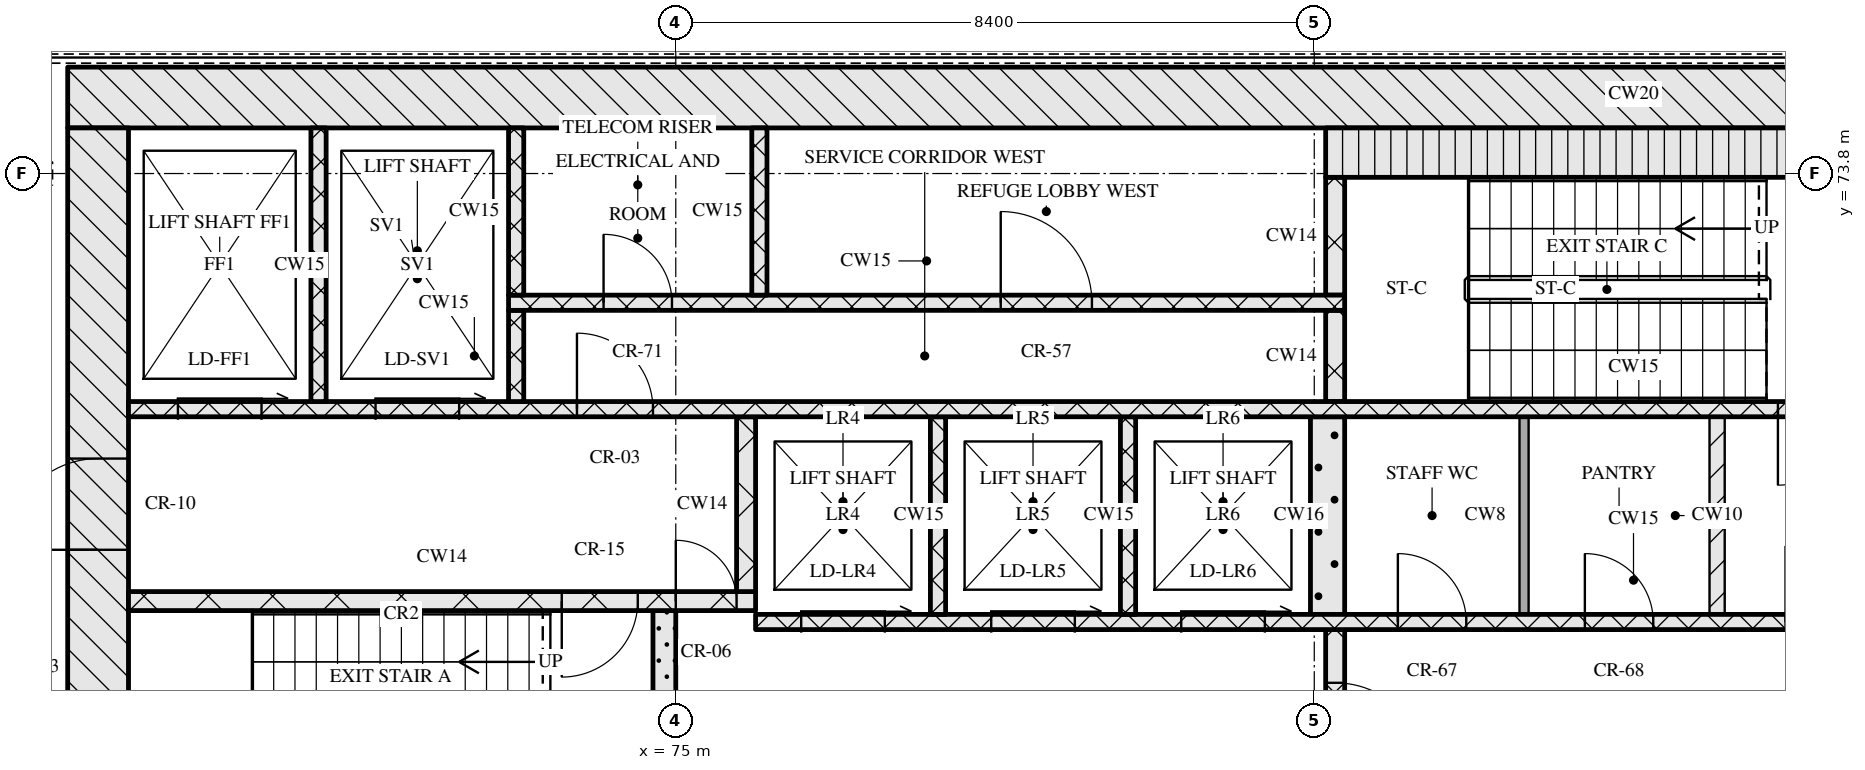
"""IFC4 building model, lengths in metres.
Left out: names, types, materials, properties, quantities, classifications, styles, units other than length and angle.
Written with IfcOpenShell. Run it as: python <this file> out.ifc"""

import sys

from ifc_helpers import new_model, si_unit, direction, frame, frame_2d, origin, place, context, subcontext, project, spatial, rectangle, extrude, element, fill, save


model = new_model("IFC4")
c1 = context("Model", 3, precision=1e-05, world=origin(), true_north=direction((0.0, 1.0)))
c2 = subcontext(c1, "Body", "Model", "MODEL_VIEW")
j1 = project(units=[si_unit("LENGTHUNIT", "METRE"), si_unit("PLANEANGLEUNIT", "RADIAN")], contexts=[c1])
p1 = place(None, origin())
s1 = spatial("IfcSite", under=j1, at=p1, CompositionType="ELEMENT")
p2 = place(p1, origin())
s2 = spatial("IfcBuilding", under=s1, at=p2, CompositionType="ELEMENT")
p3 = place(p2, frame((0.0, 0.0, 142.05)))
s3 = spatial("IfcBuildingStorey", under=s2, at=p3, CompositionType="ELEMENT", Elevation=142.05)
p4 = place(p3, frame((67.0, 74.8, 0.0), z_axis=(0.0, 0.0, 1.0), x_axis=(1.0, 0.0, 0.0)))
e1 = element("IfcWall", 1, at=p4, inside=s3, PredefinedType="SOLIDWALL", context=c2, shape_type="SweptSolid", body=[
    extrude(rectangle(XDim=41.2, YDim=0.8, at=frame_2d((20.6, 0.0))), origin(), (0.0, 0.0, 1.0), 5.12),
])
p5 = place(p3, frame((67.4, 62.4, 0.0), z_axis=(0.0, 0.0, 1.0), x_axis=(0.0, 1.0, 0.0)))
e2 = element("IfcWall", 2, at=p5, inside=s3, PredefinedType="SOLIDWALL", context=c2, shape_type="SweptSolid", body=[
    extrude(rectangle(XDim=12.0, YDim=0.8, at=frame_2d((6.0, 0.0))), origin(), (0.0, 0.0, 1.0), 5.12),
])
p6 = place(p5, frame((6.45, 0.0, 0.0)))
e3 = element("IfcOpeningElement", 3, at=p6, cuts=e2, PredefinedType="OPENING", context=c2, shape_type="SweptSolid", body=[
    extrude(rectangle(XDim=1.2, YDim=2.1, at=frame_2d((0.6, 1.05))), frame((0.0, 0.41, 0.0), z_axis=(0.0, -1.0, 0.0), x_axis=(1.0, 0.0, 0.0)), (0.0, 0.0, 1.0), 0.82),
])
p7 = place(p3, frame((74.85, 65.2, 0.0), z_axis=(0.0, 0.0, 1.0), x_axis=(0.0, 1.0, 0.0)))
e4 = element("IfcWall", 4, at=p7, inside=s3, PredefinedType="SOLIDWALL", context=c2, shape_type="SweptSolid", body=[
    extrude(rectangle(XDim=2.85, YDim=0.3, at=frame_2d((1.425, 0.0))), origin(), (0.0, 0.0, 1.0), 5.12),
])
p8 = place(p3, frame((83.675, 65.2, 0.0), z_axis=(0.0, 0.0, 1.0), x_axis=(0.0, 1.0, 0.0)))
e5 = element("IfcWall", 5, at=p8, inside=s3, PredefinedType="SOLIDWALL", context=c2, shape_type="SweptSolid", body=[
    extrude(rectangle(XDim=2.6, YDim=0.25, at=frame_2d((1.3, 0.0))), origin(), (0.0, 0.0, 1.0), 5.12),
])
p9 = place(p8, frame((0.7, 0.0, 0.0)))
e6 = element("IfcOpeningElement", 6, at=p9, cuts=e5, PredefinedType="OPENING", context=c2, shape_type="SweptSolid", body=[
    extrude(rectangle(XDim=1.2, YDim=2.1, at=frame_2d((0.6, 1.05))), frame((0.0, 0.135, 0.0), z_axis=(0.0, -1.0, 0.0), x_axis=(1.0, 0.0, 0.0)), (0.0, 0.0, 1.0), 0.27),
])
p10 = place(p3, frame((76.05, 67.9, 0.0), z_axis=(0.0, 0.0, 1.0), x_axis=(1.0, 0.0, 0.0)))
e7 = element("IfcWall", 7, at=p10, inside=s3, PredefinedType="SOLIDWALL", context=c2, shape_type="SweptSolid", body=[
    extrude(rectangle(XDim=23.1, YDim=0.2, at=frame_2d((11.55, 0.0))), origin(), (0.0, 0.0, 1.0), 5.12),
])
p11 = place(p10, frame((0.6, 0.0, 0.0)))
e8 = element("IfcOpeningElement", 8, at=p11, cuts=e7, PredefinedType="OPENING", context=c2, shape_type="SweptSolid", body=[
    extrude(rectangle(XDim=1.1, YDim=2.1, at=frame_2d((0.55, 1.05))), frame((0.0, 0.11, 0.0), z_axis=(0.0, -1.0, 0.0), x_axis=(1.0, 0.0, 0.0)), (0.0, 0.0, 1.0), 0.22),
])
p12 = place(p10, frame((3.1, 0.0, 0.0)))
e9 = element("IfcOpeningElement", 9, at=p12, cuts=e7, PredefinedType="OPENING", context=c2, shape_type="SweptSolid", body=[
    extrude(rectangle(XDim=1.1, YDim=2.1, at=frame_2d((0.55, 1.05))), frame((0.0, 0.11, 0.0), z_axis=(0.0, -1.0, 0.0), x_axis=(1.0, 0.0, 0.0)), (0.0, 0.0, 1.0), 0.22),
])
p13 = place(p10, frame((5.6, 0.0, 0.0)))
e10 = element("IfcOpeningElement", 10, at=p13, cuts=e7, PredefinedType="OPENING", context=c2, shape_type="SweptSolid", body=[
    extrude(rectangle(XDim=1.1, YDim=2.1, at=frame_2d((0.55, 1.05))), frame((0.0, 0.11, 0.0), z_axis=(0.0, -1.0, 0.0), x_axis=(1.0, 0.0, 0.0)), (0.0, 0.0, 1.0), 0.22),
])
p14 = place(p10, frame((8.45, 0.0, 0.0)))
e11 = element("IfcOpeningElement", 11, at=p14, cuts=e7, PredefinedType="OPENING", context=c2, shape_type="SweptSolid", body=[
    extrude(rectangle(XDim=0.9, YDim=2.1, at=frame_2d((0.45, 1.05))), frame((0.0, 0.11, 0.0), z_axis=(0.0, -1.0, 0.0), x_axis=(1.0, 0.0, 0.0)), (0.0, 0.0, 1.0), 0.22),
])
p15 = place(p10, frame((10.91, 0.0, 0.0)))
e12 = element("IfcOpeningElement", 12, at=p15, cuts=e7, PredefinedType="OPENING", context=c2, shape_type="SweptSolid", body=[
    extrude(rectangle(XDim=0.9, YDim=2.1, at=frame_2d((0.45, 1.05))), frame((0.0, 0.11, 0.0), z_axis=(0.0, -1.0, 0.0), x_axis=(1.0, 0.0, 0.0)), (0.0, 0.0, 1.0), 0.22),
])
p16 = place(p10, frame((13.55, 0.0, 0.0)))
e13 = element("IfcOpeningElement", 13, at=p16, cuts=e7, PredefinedType="OPENING", context=c2, shape_type="SweptSolid", body=[
    extrude(rectangle(XDim=1.0, YDim=2.1, at=frame_2d((0.5, 1.05))), frame((0.0, 0.11, 0.0), z_axis=(0.0, -1.0, 0.0), x_axis=(1.0, 0.0, 0.0)), (0.0, 0.0, 1.0), 0.22),
])
p17 = place(p10, frame((16.2, 0.0, 0.0)))
e14 = element("IfcOpeningElement", 14, at=p17, cuts=e7, PredefinedType="OPENING", context=c2, shape_type="SweptSolid", body=[
    extrude(rectangle(XDim=1.1, YDim=2.1, at=frame_2d((0.55, 1.05))), frame((0.0, 0.11, 0.0), z_axis=(0.0, -1.0, 0.0), x_axis=(1.0, 0.0, 0.0)), (0.0, 0.0, 1.0), 0.22),
])
p18 = place(p10, frame((18.7, 0.0, 0.0)))
e15 = element("IfcOpeningElement", 15, at=p18, cuts=e7, PredefinedType="OPENING", context=c2, shape_type="SweptSolid", body=[
    extrude(rectangle(XDim=1.1, YDim=2.1, at=frame_2d((0.55, 1.05))), frame((0.0, 0.11, 0.0), z_axis=(0.0, -1.0, 0.0), x_axis=(1.0, 0.0, 0.0)), (0.0, 0.0, 1.0), 0.22),
])
p19 = place(p10, frame((21.2, 0.0, 0.0)))
e16 = element("IfcOpeningElement", 16, at=p19, cuts=e7, PredefinedType="OPENING", context=c2, shape_type="SweptSolid", body=[
    extrude(rectangle(XDim=1.1, YDim=2.1, at=frame_2d((0.55, 1.05))), frame((0.0, 0.11, 0.0), z_axis=(0.0, -1.0, 0.0), x_axis=(1.0, 0.0, 0.0)), (0.0, 0.0, 1.0), 0.22),
])
for number, where, z_axis, x_axis in (
    (17, (78.45, 68.0, 0.0), (0.0, 0.0, 1.0), (0.0, 1.0, 0.0)),
    (18, (80.95, 68.0, 0.0), (0.0, 0.0, 1.0), (0.0, 1.0, 0.0)),
):
    element("IfcWall", number, at=place(p3, frame(where, z_axis=z_axis, x_axis=x_axis)), inside=s3, PredefinedType="SOLIDWALL", context=c2, shape_type="SweptSolid", body=[
        extrude(rectangle(XDim=2.6, YDim=0.2, at=frame_2d((1.3, 0.0))), origin(), (0.0, 0.0, 1.0), 5.12),
    ])
p20 = place(p3, frame((83.575, 68.0, 0.0), z_axis=(0.0, 0.0, 1.0), x_axis=(0.0, 1.0, 0.0)))
e19 = element("IfcWall", 19, at=p20, inside=s3, PredefinedType="SOLIDWALL", context=c2, shape_type="SweptSolid", body=[
    extrude(rectangle(XDim=2.6, YDim=0.45, at=frame_2d((1.3, 0.0))), origin(), (0.0, 0.0, 1.0), 5.12),
])
p21 = place(p3, frame((86.16, 68.0, 0.0), z_axis=(0.0, 0.0, 1.0), x_axis=(0.0, 1.0, 0.0)))
e20 = element("IfcWall", 20, at=p21, inside=s3, PredefinedType="PARTITIONING", context=c2, shape_type="SweptSolid", body=[
    extrude(rectangle(XDim=2.6, YDim=0.12, at=frame_2d((1.3, 0.0))), origin(), (0.0, 0.0, 1.0), 5.12),
])
p22 = place(p3, frame((88.7, 68.0, 0.0), z_axis=(0.0, 0.0, 1.0), x_axis=(0.0, 1.0, 0.0)))
e21 = element("IfcWall", 21, at=p22, inside=s3, PredefinedType="PARTITIONING", context=c2, shape_type="SweptSolid", body=[
    extrude(rectangle(XDim=2.6, YDim=0.2, at=frame_2d((1.3, 0.0))), origin(), (0.0, 0.0, 1.0), 5.12),
])
p23 = place(p3, frame((67.8, 68.175, 0.0), z_axis=(0.0, 0.0, 1.0), x_axis=(1.0, 0.0, 0.0)))
e22 = element("IfcWall", 22, at=p23, inside=s3, PredefinedType="SOLIDWALL", context=c2, shape_type="SweptSolid", body=[
    extrude(rectangle(XDim=8.25, YDim=0.25, at=frame_2d((4.125, 0.0))), origin(), (0.0, 0.0, 1.0), 5.12),
])
p24 = place(p23, frame((5.7, 0.0, 0.0)))
e23 = element("IfcOpeningElement", 23, at=p24, cuts=e22, PredefinedType="OPENING", context=c2, shape_type="SweptSolid", body=[
    extrude(rectangle(XDim=1.0, YDim=2.1, at=frame_2d((0.5, 1.05))), frame((0.0, 0.135, 0.0), z_axis=(0.0, -1.0, 0.0), x_axis=(1.0, 0.0, 0.0)), (0.0, 0.0, 1.0), 0.27),
])
p25 = place(p23, frame((7.2, 0.0, 0.0)))
e24 = element("IfcOpeningElement", 24, at=p25, cuts=e22, PredefinedType="OPENING", context=c2, shape_type="SweptSolid", body=[
    extrude(rectangle(XDim=0.8, YDim=2.1, at=frame_2d((0.4, 1.05))), frame((0.0, 0.135, 0.0), z_axis=(0.0, -1.0, 0.0), x_axis=(1.0, 0.0, 0.0)), (0.0, 0.0, 1.0), 0.27),
])
p26 = place(p3, frame((75.925, 68.3, 0.0), z_axis=(0.0, 0.0, 1.0), x_axis=(0.0, 1.0, 0.0)))
e25 = element("IfcWall", 25, at=p26, inside=s3, PredefinedType="SOLIDWALL", context=c2, shape_type="SweptSolid", body=[
    extrude(rectangle(XDim=2.3, YDim=0.25, at=frame_2d((1.15, 0.0))), origin(), (0.0, 0.0, 1.0), 5.12),
])
p27 = place(p3, frame((67.8, 70.7, 0.0), z_axis=(0.0, 0.0, 1.0), x_axis=(1.0, 0.0, 0.0)))
e26 = element("IfcWall", 26, at=p27, inside=s3, PredefinedType="SOLIDWALL", context=c2, shape_type="SweptSolid", body=[
    extrude(rectangle(XDim=39.6, YDim=0.2, at=frame_2d((19.8, 0.0))), origin(), (0.0, 0.0, 1.0), 5.12),
])
p28 = place(p27, frame((0.65, 0.0, 0.0)))
e27 = element("IfcOpeningElement", 27, at=p28, cuts=e26, PredefinedType="OPENING", context=c2, shape_type="SweptSolid", body=[
    extrude(rectangle(XDim=1.1, YDim=2.1, at=frame_2d((0.55, 1.05))), frame((0.0, 0.11, 0.0), z_axis=(0.0, -1.0, 0.0), x_axis=(1.0, 0.0, 0.0)), (0.0, 0.0, 1.0), 0.22),
])
p29 = place(p27, frame((3.25, 0.0, 0.0)))
e28 = element("IfcOpeningElement", 28, at=p29, cuts=e26, PredefinedType="OPENING", context=c2, shape_type="SweptSolid", body=[
    extrude(rectangle(XDim=1.1, YDim=2.1, at=frame_2d((0.55, 1.05))), frame((0.0, 0.11, 0.0), z_axis=(0.0, -1.0, 0.0), x_axis=(1.0, 0.0, 0.0)), (0.0, 0.0, 1.0), 0.22),
])
p30 = place(p27, frame((5.9, 0.0, 0.0)))
e29 = element("IfcOpeningElement", 29, at=p30, cuts=e26, PredefinedType="OPENING", context=c2, shape_type="SweptSolid", body=[
    extrude(rectangle(XDim=1.0, YDim=2.1, at=frame_2d((0.5, 1.05))), frame((0.0, 0.11, 0.0), z_axis=(0.0, -1.0, 0.0), x_axis=(1.0, 0.0, 0.0)), (0.0, 0.0, 1.0), 0.22),
])
p31 = place(p27, frame((21.7, 0.0, 0.0)))
e30 = element("IfcOpeningElement", 30, at=p31, cuts=e26, PredefinedType="OPENING", context=c2, shape_type="SweptSolid", body=[
    extrude(rectangle(XDim=1.0, YDim=2.1, at=frame_2d((0.5, 1.05))), frame((0.0, 0.11, 0.0), z_axis=(0.0, -1.0, 0.0), x_axis=(1.0, 0.0, 0.0)), (0.0, 0.0, 1.0), 0.22),
])
p32 = place(p27, frame((32.7, 0.0, 0.0)))
e31 = element("IfcOpeningElement", 31, at=p32, cuts=e26, PredefinedType="OPENING", context=c2, shape_type="SweptSolid", body=[
    extrude(rectangle(XDim=1.0, YDim=2.1, at=frame_2d((0.5, 1.05))), frame((0.0, 0.11, 0.0), z_axis=(0.0, -1.0, 0.0), x_axis=(1.0, 0.0, 0.0)), (0.0, 0.0, 1.0), 0.22),
])
p33 = place(p27, frame((35.25, 0.0, 0.0)))
e32 = element("IfcOpeningElement", 32, at=p33, cuts=e26, PredefinedType="OPENING", context=c2, shape_type="SweptSolid", body=[
    extrude(rectangle(XDim=1.1, YDim=2.1, at=frame_2d((0.55, 1.05))), frame((0.0, 0.11, 0.0), z_axis=(0.0, -1.0, 0.0), x_axis=(1.0, 0.0, 0.0)), (0.0, 0.0, 1.0), 0.22),
])
p34 = place(p27, frame((37.85, 0.0, 0.0)))
e33 = element("IfcOpeningElement", 33, at=p34, cuts=e26, PredefinedType="OPENING", context=c2, shape_type="SweptSolid", body=[
    extrude(rectangle(XDim=1.1, YDim=2.1, at=frame_2d((0.55, 1.05))), frame((0.0, 0.11, 0.0), z_axis=(0.0, -1.0, 0.0), x_axis=(1.0, 0.0, 0.0)), (0.0, 0.0, 1.0), 0.22),
])
p35 = place(p3, frame((70.3, 70.8, 0.0), z_axis=(0.0, 0.0, 1.0), x_axis=(0.0, 1.0, 0.0)))
e34 = element("IfcWall", 34, at=p35, inside=s3, PredefinedType="SOLIDWALL", context=c2, shape_type="SweptSolid", body=[
    extrude(rectangle(XDim=3.6, YDim=0.2, at=frame_2d((1.8, 0.0))), origin(), (0.0, 0.0, 1.0), 5.12),
])
p36 = place(p3, frame((72.9, 70.8, 0.0), z_axis=(0.0, 0.0, 1.0), x_axis=(0.0, 1.0, 0.0)))
e35 = element("IfcWall", 35, at=p36, inside=s3, PredefinedType="SOLIDWALL", context=c2, shape_type="SweptSolid", body=[
    extrude(rectangle(XDim=1.2, YDim=0.2, at=frame_2d((0.6, 0.0))), origin(), (0.0, 0.0, 1.0), 5.12),
])
p37 = place(p3, frame((83.675, 70.8, 0.0), z_axis=(0.0, 0.0, 1.0), x_axis=(0.0, 1.0, 0.0)))
e36 = element("IfcWall", 36, at=p37, inside=s3, PredefinedType="SOLIDWALL", context=c2, shape_type="SweptSolid", body=[
    extrude(rectangle(XDim=1.2, YDim=0.25, at=frame_2d((0.6, 0.0))), origin(), (0.0, 0.0, 1.0), 5.12),
])
p38 = place(p3, frame((72.8, 72.1, 0.0), z_axis=(0.0, 0.0, 1.0), x_axis=(1.0, 0.0, 0.0)))
e37 = element("IfcWall", 37, at=p38, inside=s3, PredefinedType="SOLIDWALL", context=c2, shape_type="SweptSolid", body=[
    extrude(rectangle(XDim=11.0, YDim=0.2, at=frame_2d((5.5, 0.0))), origin(), (0.0, 0.0, 1.0), 5.12),
])
p39 = place(p38, frame((1.25, 0.0, 0.0)))
e38 = element("IfcOpeningElement", 38, at=p39, cuts=e37, PredefinedType="OPENING", context=c2, shape_type="SweptSolid", body=[
    extrude(rectangle(XDim=0.9, YDim=2.1, at=frame_2d((0.45, 1.05))), frame((0.0, 0.11, 0.0), z_axis=(0.0, -1.0, 0.0), x_axis=(1.0, 0.0, 0.0)), (0.0, 0.0, 1.0), 0.22),
])
p40 = place(p38, frame((6.475, 0.0, 0.0)))
e39 = element("IfcOpeningElement", 39, at=p40, cuts=e37, PredefinedType="OPENING", context=c2, shape_type="SweptSolid", body=[
    extrude(rectangle(XDim=1.2, YDim=2.1, at=frame_2d((0.6, 1.05))), frame((0.0, 0.11, 0.0), z_axis=(0.0, -1.0, 0.0), x_axis=(1.0, 0.0, 0.0)), (0.0, 0.0, 1.0), 0.22),
])
for number, where, z_axis, x_axis in (
    (40, (72.9, 72.2, 0.0), (0.0, 0.0, 1.0), (0.0, 1.0, 0.0)),
    (41, (76.1, 72.2, 0.0), (0.0, 0.0, 1.0), (0.0, 1.0, 0.0)),
):
    element("IfcWall", number, at=place(p3, frame(where, z_axis=z_axis, x_axis=x_axis)), inside=s3, PredefinedType="SOLIDWALL", context=c2, shape_type="SweptSolid", body=[
        extrude(rectangle(XDim=2.2, YDim=0.2, at=frame_2d((1.1, 0.0))), origin(), (0.0, 0.0, 1.0), 5.12),
    ])
p41 = place(p3, frame((83.675, 72.2, 0.0), z_axis=(0.0, 0.0, 1.0), x_axis=(0.0, 1.0, 0.0)))
e42 = element("IfcWall", 42, at=p41, inside=s3, PredefinedType="SOLIDWALL", context=c2, shape_type="SweptSolid", body=[
    extrude(rectangle(XDim=1.55, YDim=0.25, at=frame_2d((0.775, 0.0))), origin(), (0.0, 0.0, 1.0), 5.12),
])
p42 = place(p3, frame((83.55, 74.075, 0.0), z_axis=(0.0, 0.0, 1.0), x_axis=(1.0, 0.0, 0.0)))
e43 = element("IfcWall", 43, at=p42, inside=s3, PredefinedType="SOLIDWALL", context=c2, shape_type="SweptSolid", body=[
    extrude(rectangle(XDim=8.1, YDim=0.65, at=frame_2d((4.05, 0.0))), origin(), (0.0, 0.0, 1.0), 5.12),
])
p43 = place(p9, origin())
e44 = element("IfcDoor", 44, at=p43, inside=s3, OperationType="SINGLE_SWING_RIGHT", PredefinedType="DOOR", context=c2, shape_type="SweptSolid", body=[
    extrude(rectangle(XDim=1.2, YDim=2.1, at=frame_2d((0.6, 1.05))), frame((0.0, 0.025, 0.0), z_axis=(0.0, -1.0, 0.0), x_axis=(1.0, 0.0, 0.0)), (0.0, 0.0, 1.0), 0.05),
])
fill(e6, e44)
p44 = place(p11, origin())
e45 = element("IfcDoor", 45, at=p44, inside=s3, OperationType="SLIDING_TO_RIGHT", PredefinedType="DOOR", context=c2, shape_type="SweptSolid", body=[
    extrude(rectangle(XDim=1.1, YDim=2.1, at=frame_2d((0.55, 1.05))), frame((0.0, 0.025, 0.0), z_axis=(0.0, -1.0, 0.0), x_axis=(1.0, 0.0, 0.0)), (0.0, 0.0, 1.0), 0.05),
])
fill(e8, e45)
p45 = place(p12, origin())
e46 = element("IfcDoor", 46, at=p45, inside=s3, OperationType="SLIDING_TO_RIGHT", PredefinedType="DOOR", context=c2, shape_type="SweptSolid", body=[
    extrude(rectangle(XDim=1.1, YDim=2.1, at=frame_2d((0.55, 1.05))), frame((0.0, 0.025, 0.0), z_axis=(0.0, -1.0, 0.0), x_axis=(1.0, 0.0, 0.0)), (0.0, 0.0, 1.0), 0.05),
])
fill(e9, e46)
p46 = place(p13, origin())
e47 = element("IfcDoor", 47, at=p46, inside=s3, OperationType="SLIDING_TO_RIGHT", PredefinedType="DOOR", context=c2, shape_type="SweptSolid", body=[
    extrude(rectangle(XDim=1.1, YDim=2.1, at=frame_2d((0.55, 1.05))), frame((0.0, 0.025, 0.0), z_axis=(0.0, -1.0, 0.0), x_axis=(1.0, 0.0, 0.0)), (0.0, 0.0, 1.0), 0.05),
])
fill(e10, e47)
p47 = place(p14, origin())
e48 = element("IfcDoor", 48, at=p47, inside=s3, OperationType="SINGLE_SWING_LEFT", PredefinedType="DOOR", context=c2, shape_type="SweptSolid", body=[
    extrude(rectangle(XDim=0.9, YDim=2.1, at=frame_2d((0.45, 1.05))), frame((0.0, 0.025, 0.0), z_axis=(0.0, -1.0, 0.0), x_axis=(1.0, 0.0, 0.0)), (0.0, 0.0, 1.0), 0.05),
])
fill(e11, e48)
p48 = place(p15, origin())
e49 = element("IfcDoor", 49, at=p48, inside=s3, OperationType="SINGLE_SWING_LEFT", PredefinedType="DOOR", context=c2, shape_type="SweptSolid", body=[
    extrude(rectangle(XDim=0.9, YDim=2.1, at=frame_2d((0.45, 1.05))), frame((0.0, 0.025, 0.0), z_axis=(0.0, -1.0, 0.0), x_axis=(1.0, 0.0, 0.0)), (0.0, 0.0, 1.0), 0.05),
])
fill(e12, e49)
p49 = place(p24, origin())
e50 = element("IfcDoor", 50, at=p49, inside=s3, OperationType="SINGLE_SWING_RIGHT", PredefinedType="DOOR", context=c2, shape_type="SweptSolid", body=[
    extrude(rectangle(XDim=1.0, YDim=2.1, at=frame_2d((0.5, 1.05))), frame((0.0, 0.025, 0.0), z_axis=(0.0, -1.0, 0.0), x_axis=(1.0, 0.0, 0.0)), (0.0, 0.0, 1.0), 0.05),
])
fill(e23, e50)
p50 = place(p25, origin())
e51 = element("IfcDoor", 51, at=p50, inside=s3, OperationType="SINGLE_SWING_LEFT", PredefinedType="DOOR", context=c2, shape_type="SweptSolid", body=[
    extrude(rectangle(XDim=0.8, YDim=2.1, at=frame_2d((0.4, 1.05))), frame((0.0, 0.025, 0.0), z_axis=(0.0, -1.0, 0.0), x_axis=(1.0, 0.0, 0.0)), (0.0, 0.0, 1.0), 0.05),
])
fill(e24, e51)
p51 = place(p6, origin())
e52 = element("IfcDoor", 52, at=p51, inside=s3, OperationType="SINGLE_SWING_LEFT", PredefinedType="DOOR", context=c2, shape_type="SweptSolid", body=[
    extrude(rectangle(XDim=1.2, YDim=2.1, at=frame_2d((0.6, 1.05))), frame((0.0, 0.025, 0.0), z_axis=(0.0, -1.0, 0.0), x_axis=(1.0, 0.0, 0.0)), (0.0, 0.0, 1.0), 0.05),
])
fill(e3, e52)
p52 = place(p28, origin())
e53 = element("IfcDoor", 53, at=p52, inside=s3, OperationType="SLIDING_TO_RIGHT", PredefinedType="DOOR", context=c2, shape_type="SweptSolid", body=[
    extrude(rectangle(XDim=1.1, YDim=2.1, at=frame_2d((0.55, 1.05))), frame((0.0, 0.025, 0.0), z_axis=(0.0, -1.0, 0.0), x_axis=(1.0, 0.0, 0.0)), (0.0, 0.0, 1.0), 0.05),
])
fill(e27, e53)
p53 = place(p29, origin())
e54 = element("IfcDoor", 54, at=p53, inside=s3, OperationType="SLIDING_TO_RIGHT", PredefinedType="DOOR", context=c2, shape_type="SweptSolid", body=[
    extrude(rectangle(XDim=1.1, YDim=2.1, at=frame_2d((0.55, 1.05))), frame((0.0, 0.025, 0.0), z_axis=(0.0, -1.0, 0.0), x_axis=(1.0, 0.0, 0.0)), (0.0, 0.0, 1.0), 0.05),
])
fill(e28, e54)
p54 = place(p30, origin())
e55 = element("IfcDoor", 55, at=p54, inside=s3, OperationType="SINGLE_SWING_LEFT", PredefinedType="DOOR", context=c2, shape_type="SweptSolid", body=[
    extrude(rectangle(XDim=1.0, YDim=2.1, at=frame_2d((0.5, 1.05))), frame((0.0, 0.025, 0.0), z_axis=(0.0, -1.0, 0.0), x_axis=(1.0, 0.0, 0.0)), (0.0, 0.0, 1.0), 0.05),
])
fill(e29, e55)
p55 = place(p31, origin())
e56 = element("IfcDoor", 56, at=p55, inside=s3, OperationType="SINGLE_SWING_RIGHT", PredefinedType="DOOR", context=c2, shape_type="SweptSolid", body=[
    extrude(rectangle(XDim=1.0, YDim=2.1, at=frame_2d((0.5, 1.05))), frame((0.0, 0.025, 0.0), z_axis=(0.0, -1.0, 0.0), x_axis=(1.0, 0.0, 0.0)), (0.0, 0.0, 1.0), 0.05),
])
fill(e30, e56)
p56 = place(p39, origin())
e57 = element("IfcDoor", 57, at=p56, inside=s3, OperationType="SINGLE_SWING_LEFT", PredefinedType="DOOR", context=c2, shape_type="SweptSolid", body=[
    extrude(rectangle(XDim=0.9, YDim=2.1, at=frame_2d((0.45, 1.05))), frame((0.0, 0.025, 0.0), z_axis=(0.0, -1.0, 0.0), x_axis=(1.0, 0.0, 0.0)), (0.0, 0.0, 1.0), 0.05),
])
fill(e38, e57)
p57 = place(p40, origin())
e58 = element("IfcDoor", 58, at=p57, inside=s3, OperationType="SINGLE_SWING_LEFT", PredefinedType="DOOR", context=c2, shape_type="SweptSolid", body=[
    extrude(rectangle(XDim=1.2, YDim=2.1, at=frame_2d((0.6, 1.05))), frame((0.0, 0.025, 0.0), z_axis=(0.0, -1.0, 0.0), x_axis=(1.0, 0.0, 0.0)), (0.0, 0.0, 1.0), 0.05),
])
fill(e39, e58)
save(model, sys.argv[1])
